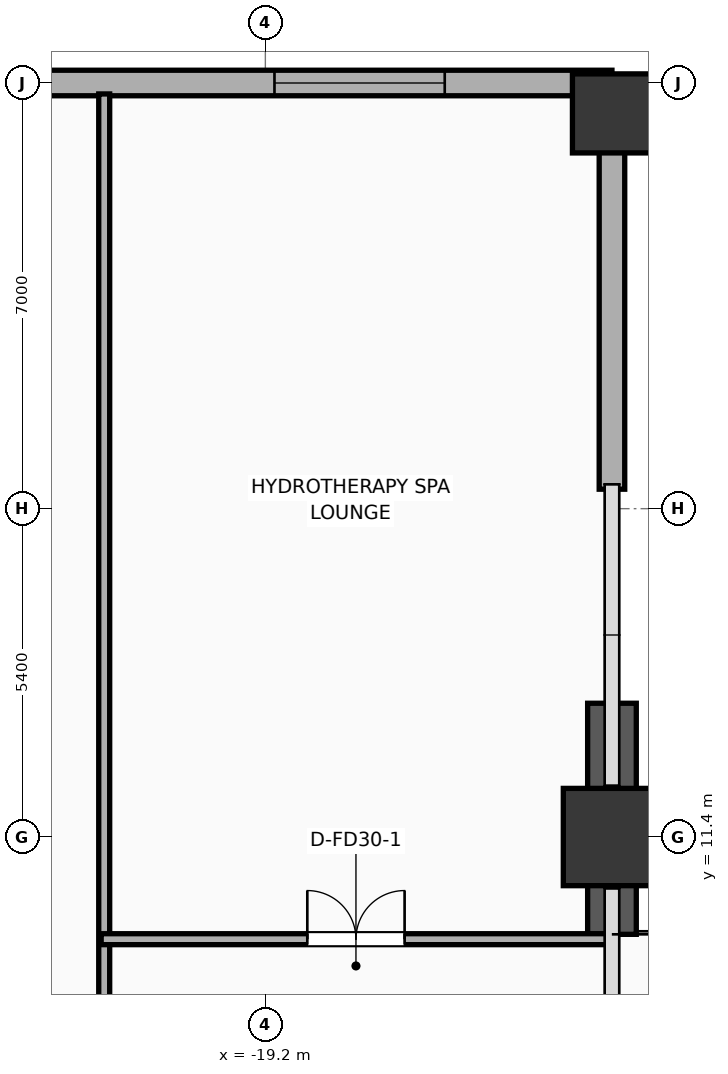
"""IFC4 building model, lengths in metres.
Left out: names, types, materials, properties, quantities, classifications, styles, units other than length and angle.
Written with IfcOpenShell. Run it as: python <this file> out.ifc"""

import sys

from ifc_helpers import new_model, si_unit, direction, frame, frame_2d, origin, origin_2d, place, context, subcontext, project, spatial, rectangle, extrude, element, fill, save


model = new_model("IFC4")
c1 = context("Model", 3, precision=1e-05, world=origin(), true_north=direction((0.0, 1.0)))
c2 = subcontext(c1, "Body", "Model", "MODEL_VIEW")
j1 = project(units=[si_unit("LENGTHUNIT", "METRE"), si_unit("PLANEANGLEUNIT", "RADIAN")], contexts=[c1])
p1 = place(None, origin())
s1 = spatial("IfcSite", under=j1, at=p1, CompositionType="ELEMENT")
p2 = place(p1, origin())
s2 = spatial("IfcBuilding", under=s1, at=p2, CompositionType="ELEMENT")
p3 = place(p2, frame((0.0, 0.0, 10.4)))
s3 = spatial("IfcBuildingStorey", under=s2, at=p3, CompositionType="ELEMENT", Elevation=10.4)
p4 = place(p3, frame((-13.5, 11.4, 0.0), z_axis=(0.0, 0.0, 1.0), x_axis=(1.0, 0.0, 0.0)))
e1 = element("IfcColumn", 1, at=p4, inside=s3, PredefinedType="COLUMN", context=c2, shape_type="SweptSolid", body=[
    extrude(rectangle(XDim=1.6, YDim=1.6, at=origin_2d()), origin(), (0.0, 0.0, 1.0), 5.2),
])
p5 = place(p3, frame((-13.5, 23.3, 0.0), z_axis=(0.0, 0.0, 1.0), x_axis=(1.0, 0.0, 0.0)))
e2 = element("IfcColumn", 2, at=p5, inside=s3, PredefinedType="COLUMN", context=c2, shape_type="SweptSolid", body=[
    extrude(rectangle(XDim=1.3, YDim=1.3, at=origin_2d()), origin(), (0.0, 0.0, 1.0), 5.2),
])
p6 = place(p3, frame((-13.5, 9.8, 0.0), z_axis=(0.0, 0.0, 1.0), x_axis=(0.0, 1.0, 0.0)))
e3 = element("IfcWall", 3, at=p6, inside=s3, PredefinedType="SOLIDWALL", context=c2, shape_type="SweptSolid", body=[
    extrude(rectangle(XDim=3.8, YDim=0.8, at=frame_2d((1.9, 0.0))), origin(), (0.0, 0.0, 1.0), 4.92),
])
p7 = place(p3, frame((-13.5, 17.12, 0.0), z_axis=(0.0, 0.0, 1.0), x_axis=(0.0, 1.0, 0.0)))
e4 = element("IfcWall", 4, at=p7, inside=s3, PredefinedType="ELEMENTEDWALL", context=c2, shape_type="SweptSolid", body=[
    extrude(rectangle(XDim=6.68, YDim=0.42, at=frame_2d((3.34, 0.0))), origin(), (0.0, 0.0, 1.0), 4.21),
])
p8 = place(p3, frame((-13.5, 23.8, 0.0), z_axis=(0.0, 0.0, 1.0), x_axis=(-1.0, 0.0, 0.0)))
e5 = element("IfcWall", 5, at=p8, inside=s3, PredefinedType="ELEMENTEDWALL", context=c2, shape_type="SweptSolid", body=[
    extrude(rectangle(XDim=24.9, YDim=0.42, at=frame_2d((12.45, 0.0))), origin(), (0.0, 0.0, 1.0), 4.92),
])
p9 = place(p8, frame((2.75, 0.0, 0.65)))
e6 = element("IfcOpeningElement", 6, at=p9, cuts=e5, PredefinedType="OPENING", context=c2, shape_type="SweptSolid", body=[
    extrude(rectangle(XDim=2.8, YDim=2.6, at=frame_2d((1.4, 1.3))), frame((0.0, 0.22, 0.0), z_axis=(0.0, -1.0, 0.0), x_axis=(1.0, 0.0, 0.0)), (0.0, 0.0, 1.0), 0.44),
])
p10 = place(p8, frame((19.35, 0.0, 0.65)))
e7 = element("IfcOpeningElement", 7, at=p10, cuts=e5, PredefinedType="OPENING", context=c2, shape_type="SweptSolid", body=[
    extrude(rectangle(XDim=2.8, YDim=2.6, at=frame_2d((1.4, 1.3))), frame((0.0, 0.22, 0.0), z_axis=(0.0, -1.0, 0.0), x_axis=(1.0, 0.0, 0.0)), (0.0, 0.0, 1.0), 0.44),
])
p11 = place(p3, frame((-21.85, -10.5, 0.0), z_axis=(0.0, 0.0, 1.0), x_axis=(0.0, 1.0, 0.0)))
e8 = element("IfcWall", 8, at=p11, inside=s3, PredefinedType="PARTITIONING", context=c2, shape_type="SweptSolid", body=[
    extrude(rectangle(XDim=34.12, YDim=0.18, at=frame_2d((17.06, 0.0))), origin(), (0.0, 0.0, 1.0), 4.92),
])
p12 = place(p11, frame((13.531, 0.0, 0.0)))
e9 = element("IfcOpeningElement", 9, at=p12, cuts=e8, PredefinedType="OPENING", context=c2, shape_type="SweptSolid", body=[
    extrude(rectangle(XDim=1.6, YDim=2.05, at=frame_2d((0.8, 1.025))), frame((0.0, 0.1, 0.0), z_axis=(0.0, -1.0, 0.0), x_axis=(1.0, 0.0, 0.0)), (0.0, 0.0, 1.0), 0.2),
])
p13 = place(p3, frame((-21.9, 9.72, 0.0), z_axis=(0.0, 0.0, 1.0), x_axis=(1.0, 0.0, 0.0)))
e10 = element("IfcWall", 10, at=p13, inside=s3, PredefinedType="PARTITIONING", context=c2, shape_type="SweptSolid", body=[
    extrude(rectangle(XDim=8.38, YDim=0.18, at=frame_2d((4.19, 0.0))), origin(), (0.0, 0.0, 1.0), 4.92),
])
p14 = place(p13, frame((3.39, 0.0, 0.0)))
e11 = element("IfcOpeningElement", 11, at=p14, cuts=e10, PredefinedType="OPENING", context=c2, shape_type="SweptSolid", body=[
    extrude(rectangle(XDim=1.6, YDim=2.05, at=frame_2d((0.8, 1.025))), frame((0.0, 0.1, 0.0), z_axis=(0.0, -1.0, 0.0), x_axis=(1.0, 0.0, 0.0)), (0.0, 0.0, 1.0), 0.2),
])
p15 = place(p9, origin())
e12 = element("IfcWindow", 12, at=p15, inside=s3, PartitioningType="SINGLE_PANEL", PredefinedType="WINDOW", context=c2, shape_type="SweptSolid", body=[
    extrude(rectangle(XDim=2.8, YDim=2.6, at=frame_2d((1.4, 1.3))), frame((0.0, 0.03, 0.0), z_axis=(0.0, -1.0, 0.0), x_axis=(1.0, 0.0, 0.0)), (0.0, 0.0, 1.0), 0.06),
])
fill(e6, e12)
p16 = place(p14, origin())
e13 = element("IfcDoor", 13, at=p16, inside=s3, OperationType="DOUBLE_DOOR_SINGLE_SWING", PredefinedType="DOOR", context=c2, shape_type="SweptSolid", body=[
    extrude(rectangle(XDim=1.6, YDim=2.05, at=frame_2d((0.8, 1.025))), frame((0.0, 0.025, 0.0), z_axis=(0.0, -1.0, 0.0), x_axis=(1.0, 0.0, 0.0)), (0.0, 0.0, 1.0), 0.05),
])
fill(e11, e13)
save(model, sys.argv[1])
